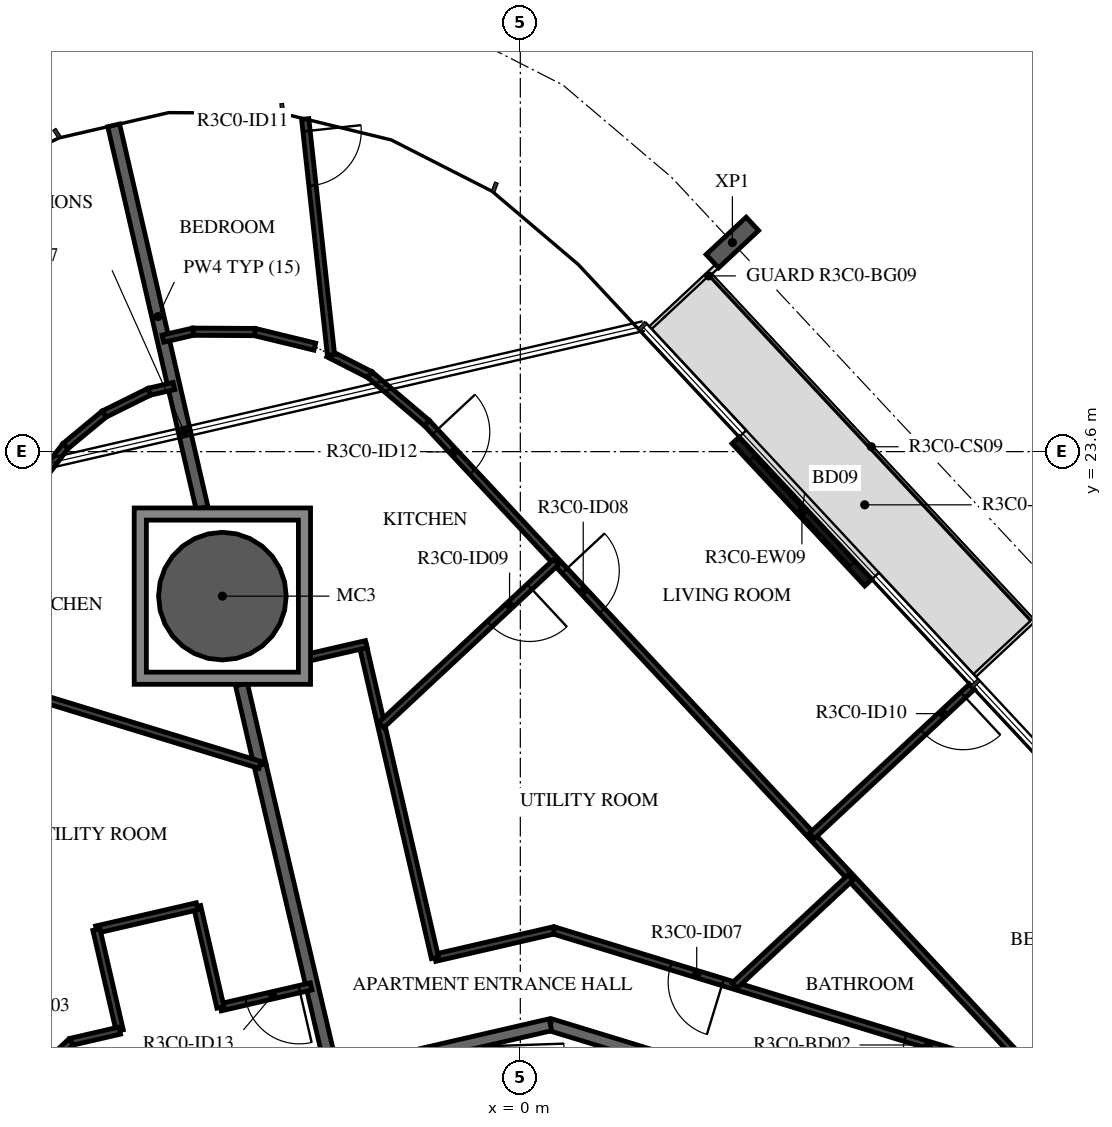
"""IFC4 building model, lengths in metres.
Left out: names, types, materials, properties, quantities, classifications, styles, units other than length and angle.
Written with IfcOpenShell. Run it as: python <this file> out.ifc"""

import sys

from ifc_helpers import new_model, si_unit, direction, frame, frame_2d, origin, origin_2d, place, context, subcontext, project, spatial, polyline, rectangle, hollow_circle, i_section, outline, extrude, element, fill, save


model = new_model("IFC4")
c1 = context("Model", 3, precision=1e-05, world=origin(), true_north=direction((0.0, 1.0)))
c2 = subcontext(c1, "Body", "Model", "MODEL_VIEW")
j1 = project(units=[si_unit("LENGTHUNIT", "METRE"), si_unit("PLANEANGLEUNIT", "RADIAN")], contexts=[c1])
p1 = place(None, origin())
s1 = spatial("IfcSite", under=j1, at=p1, CompositionType="ELEMENT")
p2 = place(p1, origin())
s2 = spatial("IfcBuilding", under=s1, at=p2, CompositionType="ELEMENT")
p3 = place(p2, frame((0.0, 0.0, 141.4)))
s3 = spatial("IfcBuildingStorey", under=s2, at=p3, CompositionType="ELEMENT", Elevation=141.4)
p4 = place(p3, frame((-4.9, 21.223, -0.38), z_axis=(0.0, 0.0, 1.0), x_axis=(1.0, 0.0, 0.0)))
e1 = element("IfcColumn", 1, at=p4, inside=s3, PredefinedType="COLUMN", context=c2, shape_type="SweptSolid", body=[
    extrude(hollow_circle(Radius=1.05, WallThickness=0.05, at=origin_2d()), origin(), (0.0, 0.0, 1.0), 2.576),
])
p5 = place(p3, frame((3.487, 27.039, -0.38), z_axis=(0.0, 0.0, 1.0), x_axis=(0.68199801865, -0.731354019992, 0.0)))
e2 = element("IfcColumn", 2, at=p5, inside=s3, PredefinedType="COLUMN", context=c2, shape_type="SweptSolid", body=[
    extrude(i_section(OverallWidth=0.3, OverallDepth=0.9, WebThickness=0.019, FlangeThickness=0.035, FilletRadius=0.03, at=origin_2d()), origin(), (0.0, 0.0, 1.0), 2.616),
])
p6 = place(p3, frame((5.722, 21.446, 0.0), z_axis=(0.0, 0.0, 1.0), x_axis=(-0.681994703002, 0.731357111866, 0.0)))
e3 = element("IfcWall", 3, at=p6, inside=s3, PredefinedType="STANDARD", context=c2, shape_type="SweptSolid", body=[
    extrude(rectangle(XDim=3.2, YDim=0.16, at=frame_2d((1.6, 0.0))), origin(), (0.0, 0.0, 1.0), 3.05),
])
p7 = place(p6, frame((0.4, 0.0, 0.0)))
e4 = element("IfcOpeningElement", 4, at=p7, cuts=e3, PredefinedType="OPENING", context=c2, shape_type="SweptSolid", body=[
    extrude(rectangle(XDim=2.4, YDim=2.4, at=frame_2d((1.2, 1.2))), frame((0.0, 0.09, 0.0), z_axis=(0.0, -1.0, 0.0), x_axis=(1.0, 0.0, 0.0)), (0.0, 0.0, 1.0), 0.18),
])
p8 = place(p3, frame((-0.487, 13.948, 0.0), z_axis=(0.0, 0.0, 1.0), x_axis=(0.034859752231, -0.999392214135, 0.0)))
e5 = element("IfcWall", 5, at=p8, inside=s3, PredefinedType="PARTITIONING", context=c2, shape_type="SweptSolid", body=[
    extrude(rectangle(XDim=2.052, YDim=0.12, at=frame_2d((1.026, 0.0))), origin(), (0.0, 0.0, 1.0), 3.05),
])
p9 = place(p8, frame((0.125, 0.0, 0.0)))
e6 = element("IfcOpeningElement", 6, at=p9, cuts=e5, PredefinedType="OPENING", context=c2, shape_type="SweptSolid", body=[
    extrude(rectangle(XDim=1.2, YDim=2.1, at=frame_2d((0.6, 1.05))), frame((0.0, 0.07, 0.0), z_axis=(0.0, -1.0, 0.0), x_axis=(1.0, 0.0, 0.0)), (0.0, 0.0, 1.0), 0.14),
])
p10 = place(p3, frame((7.516, 12.028, 0.0), z_axis=(0.0, 0.0, 1.0), x_axis=(-0.956306642771, 0.292365533182, 0.0)))
e7 = element("IfcWall", 7, at=p10, inside=s3, PredefinedType="STANDARD", context=c2, shape_type="SweptSolid", body=[
    extrude(rectangle(XDim=7.342, YDim=0.2, at=frame_2d((3.671, 0.0))), origin(), (0.0, 0.0, 1.0), 3.05),
])
p11 = place(p3, frame((0.495, 14.175, 0.0), z_axis=(0.0, 0.0, 1.0), x_axis=(-0.974376622151, -0.224922649383, 0.0)))
e8 = element("IfcWall", 8, at=p11, inside=s3, PredefinedType="STANDARD", context=c2, shape_type="SweptSolid", body=[
    extrude(rectangle(XDim=7.342, YDim=0.2, at=frame_2d((3.671, 0.0))), origin(), (0.0, 0.0, 1.0), 3.05),
])
p12 = place(p3, frame((-4.281, 18.448, 0.0), z_axis=(0.0, 0.0, 1.0), x_axis=(0.228867856942, -0.973457499873, 0.0)))
e9 = element("IfcWall", 9, at=p12, inside=s3, PredefinedType="STANDARD", context=c2, shape_type="SweptSolid", body=[
    extrude(rectangle(XDim=5.238, YDim=0.2, at=frame_2d((2.619, 0.0))), origin(), (0.0, 0.0, 1.0), 3.05),
])
p13 = place(p3, frame((-4.586, 19.771, 0.0), z_axis=(0.0, 0.0, 1.0), x_axis=(0.224898895484, -0.974382105136, 0.0)))
e10 = element("IfcWall", 10, at=p13, inside=s3, PredefinedType="STANDARD", context=c2, shape_type="SweptSolid", body=[
    extrude(rectangle(XDim=1.358, YDim=0.2, at=frame_2d((0.679, 0.0))), origin(), (0.0, 0.0, 1.0), 3.05),
])
p14 = place(p3, frame((-6.687, 28.966, 0.0), z_axis=(0.0, 0.0, 1.0), x_axis=(0.224945100086, -0.974371439415, 0.0)))
e11 = element("IfcWall", 11, at=p14, inside=s3, PredefinedType="STANDARD", context=c2, shape_type="SweptSolid", body=[
    extrude(rectangle(XDim=6.458, YDim=0.2, at=frame_2d((3.229, 0.0))), origin(), (0.0, 0.0, 1.0), 3.05),
])
p15 = place(p3, frame((8.339, 13.345, 0.0), z_axis=(0.0, 0.0, 1.0), x_axis=(-0.956310145342, 0.292354076276, 0.0)))
e12 = element("IfcWall", 12, at=p15, inside=s3, PredefinedType="PARTITIONING", context=c2, shape_type="SweptSolid", body=[
    extrude(rectangle(XDim=8.146, YDim=0.12, at=frame_2d((4.073, 0.0))), origin(), (0.0, 0.0, 1.0), 3.05),
])
p16 = place(p15, frame((1.3, 0.0, 0.0)))
e13 = element("IfcOpeningElement", 13, at=p16, cuts=e12, PredefinedType="OPENING", context=c2, shape_type="SweptSolid", body=[
    extrude(rectangle(XDim=0.8, YDim=2.1, at=frame_2d((0.4, 1.05))), frame((0.0, 0.07, 0.0), z_axis=(0.0, -1.0, 0.0), x_axis=(1.0, 0.0, 0.0)), (0.0, 0.0, 1.0), 0.14),
])
p17 = place(p15, frame((5.237, 0.0, 0.0)))
e14 = element("IfcOpeningElement", 14, at=p17, cuts=e12, PredefinedType="OPENING", context=c2, shape_type="SweptSolid", body=[
    extrude(rectangle(XDim=0.9, YDim=2.1, at=frame_2d((0.45, 1.05))), frame((0.0, 0.07, 0.0), z_axis=(0.0, -1.0, 0.0), x_axis=(1.0, 0.0, 0.0)), (0.0, 0.0, 1.0), 0.14),
])
p18 = place(p3, frame((0.549, 15.727, 0.0), z_axis=(0.0, 0.0, 1.0), x_axis=(-0.97436861061, -0.224957352975, 0.0)))
e15 = element("IfcWall", 15, at=p18, inside=s3, PredefinedType="PARTITIONING", context=c2, shape_type="SweptSolid", body=[
    extrude(rectangle(XDim=2.004, YDim=0.12, at=frame_2d((1.002, 0.0))), origin(), (0.0, 0.0, 1.0), 3.05),
])
p19 = place(p3, frame((-1.404, 15.276, 0.0), z_axis=(0.0, 0.0, 1.0), x_axis=(-0.224947305813, 0.974370930194, 0.0)))
e16 = element("IfcWall", 16, at=p19, inside=s3, PredefinedType="PARTITIONING", context=c2, shape_type="SweptSolid", body=[
    extrude(rectangle(XDim=5.28, YDim=0.12, at=frame_2d((2.64, 0.0))), origin(), (0.0, 0.0, 1.0), 3.05),
])
p20 = place(p3, frame((-2.533, 20.434, 0.0), z_axis=(0.0, 0.0, 1.0), x_axis=(-0.974387124574, -0.224877147491, 0.0)))
e17 = element("IfcWall", 17, at=p20, inside=s3, PredefinedType="PARTITIONING", context=c2, shape_type="SweptSolid", body=[
    extrude(rectangle(XDim=1.011, YDim=0.12, at=frame_2d((0.505, 0.0))), origin(), (0.0, 0.0, 1.0), 3.05),
])
p21 = place(p3, frame((-1.539, 24.071, 0.0), z_axis=(0.0, 0.0, 1.0), x_axis=(0.68200220595, -0.731350115252, 0.0)))
e18 = element("IfcWall", 18, at=p21, inside=s3, PredefinedType="PARTITIONING", context=c2, shape_type="SweptSolid", body=[
    extrude(rectangle(XDim=17.316, YDim=0.12, at=frame_2d((8.658, 0.0))), origin(), (0.0, 0.0, 1.0), 3.05),
])
p22 = place(p21, frame((3.323, 0.0, 0.0)))
e19 = element("IfcOpeningElement", 19, at=p22, cuts=e18, PredefinedType="OPENING", context=c2, shape_type="SweptSolid", body=[
    extrude(rectangle(XDim=0.9, YDim=2.1, at=frame_2d((0.45, 1.05))), frame((0.0, 0.07, 0.0), z_axis=(0.0, -1.0, 0.0), x_axis=(1.0, 0.0, 0.0)), (0.0, 0.0, 1.0), 0.14),
])
p23 = place(p21, frame((0.2, 0.0, 0.0)))
e20 = element("IfcOpeningElement", 20, at=p23, cuts=e18, PredefinedType="OPENING", context=c2, shape_type="SweptSolid", body=[
    extrude(rectangle(XDim=0.9, YDim=2.1, at=frame_2d((0.45, 1.05))), frame((0.0, 0.07, 0.0), z_axis=(0.0, -1.0, 0.0), x_axis=(1.0, 0.0, 0.0)), (0.0, 0.0, 1.0), 0.14),
])
p24 = place(p3, frame((7.427, 19.734, 0.0), z_axis=(0.0, 0.0, 1.0), x_axis=(-0.73139345201, -0.681955730497, 0.0)))
e21 = element("IfcWall", 21, at=p24, inside=s3, PredefinedType="PARTITIONING", context=c2, shape_type="SweptSolid", body=[
    extrude(rectangle(XDim=3.6, YDim=0.12, at=frame_2d((1.8, 0.0))), origin(), (0.0, 0.0, 1.0), 3.05),
])
p25 = place(p24, frame((0.2, 0.0, 0.0)))
e22 = element("IfcOpeningElement", 22, at=p25, cuts=e21, PredefinedType="OPENING", context=c2, shape_type="SweptSolid", body=[
    extrude(rectangle(XDim=0.9, YDim=2.1, at=frame_2d((0.45, 1.05))), frame((0.0, 0.07, 0.0), z_axis=(0.0, -1.0, 0.0), x_axis=(1.0, 0.0, 0.0)), (0.0, 0.0, 1.0), 0.14),
])
p26 = place(p3, frame((5.431, 16.597, 0.0), z_axis=(0.0, 0.0, 1.0), x_axis=(-0.731378807316, -0.681971436505, 0.0)))
e23 = element("IfcWall", 23, at=p26, inside=s3, PredefinedType="PARTITIONING", context=c2, shape_type="SweptSolid", body=[
    extrude(rectangle(XDim=2.609, YDim=0.12, at=frame_2d((1.305, 0.0))), origin(), (0.0, 0.0, 1.0), 3.05),
])
p27 = place(p3, frame((-3.156, 25.212, 0.0), z_axis=(0.0, 0.0, 1.0), x_axis=(0.890954246936, -0.454093085025, 0.0)))
e24 = element("IfcWall", 24, at=p27, inside=s3, PredefinedType="PARTITIONING", context=c2, shape_type="SweptSolid", body=[
    extrude(rectangle(XDim=0.765, YDim=0.12, at=frame_2d((0.383, 0.0))), origin(), (0.0, 0.0, 1.0), 3.05),
])
p28 = place(p3, frame((-2.474, 24.865, 0.0), z_axis=(0.0, 0.0, 1.0), x_axis=(0.762351487461, -0.647163201647, 0.0)))
e25 = element("IfcWall", 25, at=p28, inside=s3, PredefinedType="PARTITIONING", context=c2, shape_type="SweptSolid", body=[
    extrude(rectangle(XDim=1.227, YDim=0.12, at=frame_2d((0.614, 0.0))), origin(), (0.0, 0.0, 1.0), 3.05),
])
p29 = place(p3, frame((-3.538, 29.07, 0.0), z_axis=(0.0, 0.0, 1.0), x_axis=(0.1087420482, -0.994070001033, 0.0)))
e26 = element("IfcWall", 26, at=p29, inside=s3, PredefinedType="PARTITIONING", context=c2, shape_type="SweptSolid", body=[
    extrude(rectangle(XDim=3.902, YDim=0.12, at=frame_2d((1.951, 0.0))), origin(), (0.0, 0.0, 1.0), 3.05),
])
p30 = place(p29, frame((0.2, 0.0, 0.0)))
e27 = element("IfcOpeningElement", 27, at=p30, cuts=e26, PredefinedType="OPENING", context=c2, shape_type="SweptSolid", body=[
    extrude(rectangle(XDim=0.9, YDim=2.1, at=frame_2d((0.45, 1.05))), frame((0.0, 0.07, 0.0), z_axis=(0.0, -1.0, 0.0), x_axis=(1.0, 0.0, 0.0)), (0.0, 0.0, 1.0), 0.14),
])
p31 = place(p3, frame((0.591, 21.787, 0.0), z_axis=(0.0, 0.0, 1.0), x_axis=(-0.731364619453, -0.681986651931, 0.0)))
e28 = element("IfcWall", 28, at=p31, inside=s3, PredefinedType="PARTITIONING", context=c2, shape_type="SweptSolid", body=[
    extrude(rectangle(XDim=3.936, YDim=0.12, at=frame_2d((1.968, 0.0))), origin(), (0.0, 0.0, 1.0), 3.05),
])
p32 = place(p31, frame((0.6, 0.0, 0.0)))
e29 = element("IfcOpeningElement", 29, at=p32, cuts=e28, PredefinedType="OPENING", context=c2, shape_type="SweptSolid", body=[
    extrude(rectangle(XDim=0.9, YDim=2.1, at=frame_2d((0.45, 1.05))), frame((0.0, 0.07, 0.0), z_axis=(0.0, -1.0, 0.0), x_axis=(1.0, 0.0, 0.0)), (0.0, 0.0, 1.0), 0.14),
])
p33 = place(p3, frame((-3.379, 25.326, 0.0), z_axis=(0.0, 0.0, 1.0), x_axis=(-0.971704876381, 0.236198292157, 0.0)))
e30 = element("IfcWall", 30, at=p33, inside=s3, PredefinedType="PARTITIONING", context=c2, shape_type="SweptSolid", body=[
    extrude(rectangle(XDim=1.016, YDim=0.12, at=frame_2d((0.508, 0.0))), origin(), (0.0, 0.0, 1.0), 3.05),
])
p34 = place(p3, frame((-4.367, 25.566, 0.0), z_axis=(0.0, 0.0, 1.0), x_axis=(-0.999983366401, 0.005767748328, 0.0)))
e31 = element("IfcWall", 31, at=p34, inside=s3, PredefinedType="PARTITIONING", context=c2, shape_type="SweptSolid", body=[
    extrude(rectangle(XDim=1.016, YDim=0.12, at=frame_2d((0.508, 0.0))), origin(), (0.0, 0.0, 1.0), 3.05),
])
p35 = place(p3, frame((-5.383, 25.572, 0.0), z_axis=(0.0, 0.0, 1.0), x_axis=(-0.974366885246, -0.224964825997, 0.0)))
e32 = element("IfcWall", 32, at=p35, inside=s3, PredefinedType="PARTITIONING", context=c2, shape_type="SweptSolid", body=[
    extrude(rectangle(XDim=0.508, YDim=0.12, at=frame_2d((0.254, 0.0))), origin(), (0.0, 0.0, 1.0), 3.05),
])
p36 = place(p3, frame((-3.44, 14.806, 0.0), z_axis=(0.0, 0.0, 1.0), x_axis=(-0.974356244071, -0.225010910046, 0.0)))
e33 = element("IfcWall", 33, at=p36, inside=s3, PredefinedType="PARTITIONING", context=c2, shape_type="SweptSolid", body=[
    extrude(rectangle(XDim=1.531, YDim=0.12, at=frame_2d((0.766, 0.0))), origin(), (0.0, 0.0, 1.0), 3.05),
])
p37 = place(p36, frame((0.2, 0.0, 0.0)))
e34 = element("IfcOpeningElement", 34, at=p37, cuts=e33, PredefinedType="OPENING", context=c2, shape_type="SweptSolid", body=[
    extrude(rectangle(XDim=0.9, YDim=2.1, at=frame_2d((0.45, 1.05))), frame((0.0, 0.07, 0.0), z_axis=(0.0, -1.0, 0.0), x_axis=(1.0, 0.0, 0.0)), (0.0, 0.0, 1.0), 0.14),
])
p38 = place(p3, frame((-4.931, 14.461, 0.0), z_axis=(0.0, 0.0, 1.0), x_axis=(-0.224911785629, 0.974379129849, 0.0)))
e35 = element("IfcWall", 35, at=p38, inside=s3, PredefinedType="PARTITIONING", context=c2, shape_type="SweptSolid", body=[
    extrude(rectangle(XDim=1.705, YDim=0.12, at=frame_2d((0.853, 0.0))), origin(), (0.0, 0.0, 1.0), 3.05),
])
p39 = place(p3, frame((-5.315, 16.123, 0.0), z_axis=(0.0, 0.0, 1.0), x_axis=(-0.974352456598, -0.225027310168, 0.0)))
e36 = element("IfcWall", 36, at=p39, inside=s3, PredefinedType="PARTITIONING", context=c2, shape_type="SweptSolid", body=[
    extrude(rectangle(XDim=1.7, YDim=0.12, at=frame_2d((0.85, 0.0))), origin(), (0.0, 0.0, 1.0), 3.05),
])
p40 = place(p3, frame((-6.971, 15.74, 0.0), z_axis=(0.0, 0.0, 1.0), x_axis=(0.224943164347, -0.974371886301, 0.0)))
e37 = element("IfcWall", 37, at=p40, inside=s3, PredefinedType="PARTITIONING", context=c2, shape_type="SweptSolid", body=[
    extrude(rectangle(XDim=1.705, YDim=0.12, at=frame_2d((0.853, 0.0))), origin(), (0.0, 0.0, 1.0), 3.05),
])
p41 = place(p3, frame((-6.588, 14.079, 0.0), z_axis=(0.0, 0.0, 1.0), x_axis=(-0.974391195695, -0.224859506699, 0.0)))
e38 = element("IfcWall", 38, at=p41, inside=s3, PredefinedType="PARTITIONING", context=c2, shape_type="SweptSolid", body=[
    extrude(rectangle(XDim=0.821, YDim=0.12, at=frame_2d((0.41, 0.0))), origin(), (0.0, 0.0, 1.0), 3.05),
])
p42 = place(p3, frame((-7.388, 13.894, 0.0), z_axis=(0.0, 0.0, 1.0), x_axis=(-0.731357186721, -0.681994622729, 0.0)))
e39 = element("IfcWall", 39, at=p42, inside=s3, PredefinedType="PARTITIONING", context=c2, shape_type="SweptSolid", body=[
    extrude(rectangle(XDim=8.146, YDim=0.12, at=frame_2d((4.073, 0.0))), origin(), (0.0, 0.0, 1.0), 3.05),
])
p43 = place(p42, frame((0.725, 0.0, 0.0)))
e40 = element("IfcOpeningElement", 40, at=p43, cuts=e39, PredefinedType="OPENING", context=c2, shape_type="SweptSolid", body=[
    extrude(rectangle(XDim=0.8, YDim=2.1, at=frame_2d((0.4, 1.05))), frame((0.0, 0.07, 0.0), z_axis=(0.0, -1.0, 0.0), x_axis=(1.0, 0.0, 0.0)), (0.0, 0.0, 1.0), 0.14),
])
p44 = place(p42, frame((6.927, 0.0, 0.0)))
e41 = element("IfcOpeningElement", 41, at=p44, cuts=e39, PredefinedType="OPENING", context=c2, shape_type="SweptSolid", body=[
    extrude(rectangle(XDim=0.9, YDim=2.1, at=frame_2d((0.45, 1.05))), frame((0.0, 0.07, 0.0), z_axis=(0.0, -1.0, 0.0), x_axis=(1.0, 0.0, 0.0)), (0.0, 0.0, 1.0), 0.14),
])
p45 = place(p3, frame((-5.698, 24.679, 0.0), z_axis=(0.0, 0.0, 1.0), x_axis=(-0.974222160042, -0.225590742017, 0.0)))
e42 = element("IfcWall", 42, at=p45, inside=s3, PredefinedType="PARTITIONING", context=c2, shape_type="SweptSolid", body=[
    extrude(rectangle(XDim=0.415, YDim=0.12, at=frame_2d((0.207, 0.0))), origin(), (0.0, 0.0, 1.0), 3.05),
])
p46 = place(p3, frame((-6.101, 24.585, 0.0), z_axis=(0.0, 0.0, 1.0), x_axis=(-0.896362871824, -0.443321104862, 0.0)))
e43 = element("IfcWall", 43, at=p46, inside=s3, PredefinedType="PARTITIONING", context=c2, shape_type="SweptSolid", body=[
    extrude(rectangle(XDim=0.829, YDim=0.12, at=frame_2d((0.415, 0.0))), origin(), (0.0, 0.0, 1.0), 3.05),
])
p47 = place(p3, frame((-6.844, 24.218, 0.0), z_axis=(0.0, 0.0, 1.0), x_axis=(-0.769715611418, -0.63838693403, 0.0)))
e44 = element("IfcWall", 44, at=p47, inside=s3, PredefinedType="PARTITIONING", context=c2, shape_type="SweptSolid", body=[
    extrude(rectangle(XDim=0.829, YDim=0.12, at=frame_2d((0.415, 0.0))), origin(), (0.0, 0.0, 1.0), 3.05),
])
p48 = place(p3, frame((-7.482, 23.688, 0.0), z_axis=(0.0, 0.0, 1.0), x_axis=(-0.601836624867, -0.798619231529, 0.0)))
e45 = element("IfcWall", 45, at=p48, inside=s3, PredefinedType="PARTITIONING", context=c2, shape_type="SweptSolid", body=[
    extrude(rectangle(XDim=0.829, YDim=0.12, at=frame_2d((0.415, 0.0))), origin(), (0.0, 0.0, 1.0), 3.05),
])
p49 = place(p3, frame((-9.066, 19.91, 0.0), z_axis=(0.0, 0.0, 1.0), x_axis=(0.956313309797, -0.292343724928, 0.0)))
e46 = element("IfcWall", 46, at=p49, inside=s3, PredefinedType="PARTITIONING", context=c2, shape_type="SweptSolid", body=[
    extrude(rectangle(XDim=5.004, YDim=0.12, at=frame_2d((2.502, 0.0))), origin(), (0.0, 0.0, 1.0), 3.05),
])
p50 = place(p49, frame((0.2, 0.0, 0.0)))
e47 = element("IfcOpeningElement", 47, at=p50, cuts=e46, PredefinedType="OPENING", context=c2, shape_type="SweptSolid", body=[
    extrude(rectangle(XDim=0.9, YDim=2.1, at=frame_2d((0.45, 1.05))), frame((0.0, 0.07, 0.0), z_axis=(0.0, -1.0, 0.0), x_axis=(1.0, 0.0, 0.0)), (0.0, 0.0, 1.0), 0.14),
])
p51 = place(p3, frame((-10.687, 14.608, 0.0), z_axis=(0.0, 0.0, 1.0), x_axis=(0.956295309419, -0.292402601189, 0.0)))
e48 = element("IfcWall", 48, at=p51, inside=s3, PredefinedType="PARTITIONING", context=c2, shape_type="SweptSolid", body=[
    extrude(rectangle(XDim=3.201, YDim=0.12, at=frame_2d((1.601, 0.0))), origin(), (0.0, 0.0, 1.0), 3.05),
])
p52 = place(p3, origin())
e49 = element("IfcWall", 49, at=p52, inside=s3, PredefinedType="STANDARD", context=c2, shape_type="SweptSolid", body=[
    extrude(outline(polyline([(-3.45, 22.674), (-3.45, 19.773), (-6.35, 19.773), (-6.35, 22.674), (-3.45, 22.674)]), holes=[polyline([(-6.15, 19.973), (-3.65, 19.973), (-3.65, 22.473), (-6.15, 22.473), (-6.15, 19.973)])]), origin(), (0.0, 0.0, 1.0), 3.05),
])
p53 = place(p7, origin())
e50 = element("IfcDoor", 50, at=p53, inside=s3, OperationType="DOUBLE_DOOR_SLIDING", PredefinedType="DOOR", context=c2, shape_type="SweptSolid", body=[
    extrude(rectangle(XDim=2.4, YDim=2.4, at=frame_2d((1.2, 1.2))), frame((0.0, 0.025, 0.0), z_axis=(0.0, -1.0, 0.0), x_axis=(1.0, 0.0, 0.0)), (0.0, 0.0, 1.0), 0.05),
])
fill(e4, e50)
p54 = place(p16, origin())
e51 = element("IfcDoor", 51, at=p54, inside=s3, OperationType="SINGLE_SWING_RIGHT", PredefinedType="DOOR", context=c2, shape_type="SweptSolid", body=[
    extrude(rectangle(XDim=0.8, YDim=2.1, at=frame_2d((0.4, 1.05))), frame((0.0, 0.025, 0.0), z_axis=(0.0, -1.0, 0.0), x_axis=(1.0, 0.0, 0.0)), (0.0, 0.0, 1.0), 0.05),
])
fill(e13, e51)
p55 = place(p17, origin())
e52 = element("IfcDoor", 52, at=p55, inside=s3, OperationType="SINGLE_SWING_RIGHT", PredefinedType="DOOR", context=c2, shape_type="SweptSolid", body=[
    extrude(rectangle(XDim=0.9, YDim=2.1, at=frame_2d((0.45, 1.05))), frame((0.0, 0.025, 0.0), z_axis=(0.0, -1.0, 0.0), x_axis=(1.0, 0.0, 0.0)), (0.0, 0.0, 1.0), 0.05),
])
fill(e14, e52)
p56 = place(p22, origin())
e53 = element("IfcDoor", 53, at=p56, inside=s3, OperationType="SINGLE_SWING_RIGHT", PredefinedType="DOOR", context=c2, shape_type="SweptSolid", body=[
    extrude(rectangle(XDim=0.9, YDim=2.1, at=frame_2d((0.45, 1.05))), frame((0.0, 0.025, 0.0), z_axis=(0.0, -1.0, 0.0), x_axis=(1.0, 0.0, 0.0)), (0.0, 0.0, 1.0), 0.05),
])
fill(e19, e53)
p57 = place(p32, origin())
e54 = element("IfcDoor", 54, at=p57, inside=s3, OperationType="SINGLE_SWING_RIGHT", PredefinedType="DOOR", context=c2, shape_type="SweptSolid", body=[
    extrude(rectangle(XDim=0.9, YDim=2.1, at=frame_2d((0.45, 1.05))), frame((0.0, 0.025, 0.0), z_axis=(0.0, -1.0, 0.0), x_axis=(1.0, 0.0, 0.0)), (0.0, 0.0, 1.0), 0.05),
])
fill(e29, e54)
p58 = place(p25, origin())
e55 = element("IfcDoor", 55, at=p58, inside=s3, OperationType="SINGLE_SWING_LEFT", PredefinedType="DOOR", context=c2, shape_type="SweptSolid", body=[
    extrude(rectangle(XDim=0.9, YDim=2.1, at=frame_2d((0.45, 1.05))), frame((0.0, 0.025, 0.0), z_axis=(0.0, -1.0, 0.0), x_axis=(1.0, 0.0, 0.0)), (0.0, 0.0, 1.0), 0.05),
])
fill(e22, e55)
p59 = place(p30, origin())
e56 = element("IfcDoor", 56, at=p59, inside=s3, OperationType="SINGLE_SWING_RIGHT", PredefinedType="DOOR", context=c2, shape_type="SweptSolid", body=[
    extrude(rectangle(XDim=0.9, YDim=2.1, at=frame_2d((0.45, 1.05))), frame((0.0, 0.025, 0.0), z_axis=(0.0, -1.0, 0.0), x_axis=(1.0, 0.0, 0.0)), (0.0, 0.0, 1.0), 0.05),
])
fill(e27, e56)
p60 = place(p23, origin())
e57 = element("IfcDoor", 57, at=p60, inside=s3, OperationType="SINGLE_SWING_LEFT", PredefinedType="DOOR", context=c2, shape_type="SweptSolid", body=[
    extrude(rectangle(XDim=0.9, YDim=2.1, at=frame_2d((0.45, 1.05))), frame((0.0, 0.025, 0.0), z_axis=(0.0, -1.0, 0.0), x_axis=(1.0, 0.0, 0.0)), (0.0, 0.0, 1.0), 0.05),
])
fill(e20, e57)
p61 = place(p37, origin())
e58 = element("IfcDoor", 58, at=p61, inside=s3, OperationType="SINGLE_SWING_LEFT", PredefinedType="DOOR", context=c2, shape_type="SweptSolid", body=[
    extrude(rectangle(XDim=0.9, YDim=2.1, at=frame_2d((0.45, 1.05))), frame((0.0, 0.025, 0.0), z_axis=(0.0, -1.0, 0.0), x_axis=(1.0, 0.0, 0.0)), (0.0, 0.0, 1.0), 0.05),
])
fill(e34, e58)
p62 = place(p9, origin())
e59 = element("IfcDoor", 59, at=p62, inside=s3, OperationType="DOUBLE_DOOR_SINGLE_SWING", PredefinedType="DOOR", context=c2, shape_type="SweptSolid", body=[
    extrude(rectangle(XDim=1.2, YDim=2.1, at=frame_2d((0.6, 1.05))), frame((0.0, 0.025, 0.0), z_axis=(0.0, -1.0, 0.0), x_axis=(1.0, 0.0, 0.0)), (0.0, 0.0, 1.0), 0.05),
])
fill(e6, e59)
save(model, sys.argv[1])
